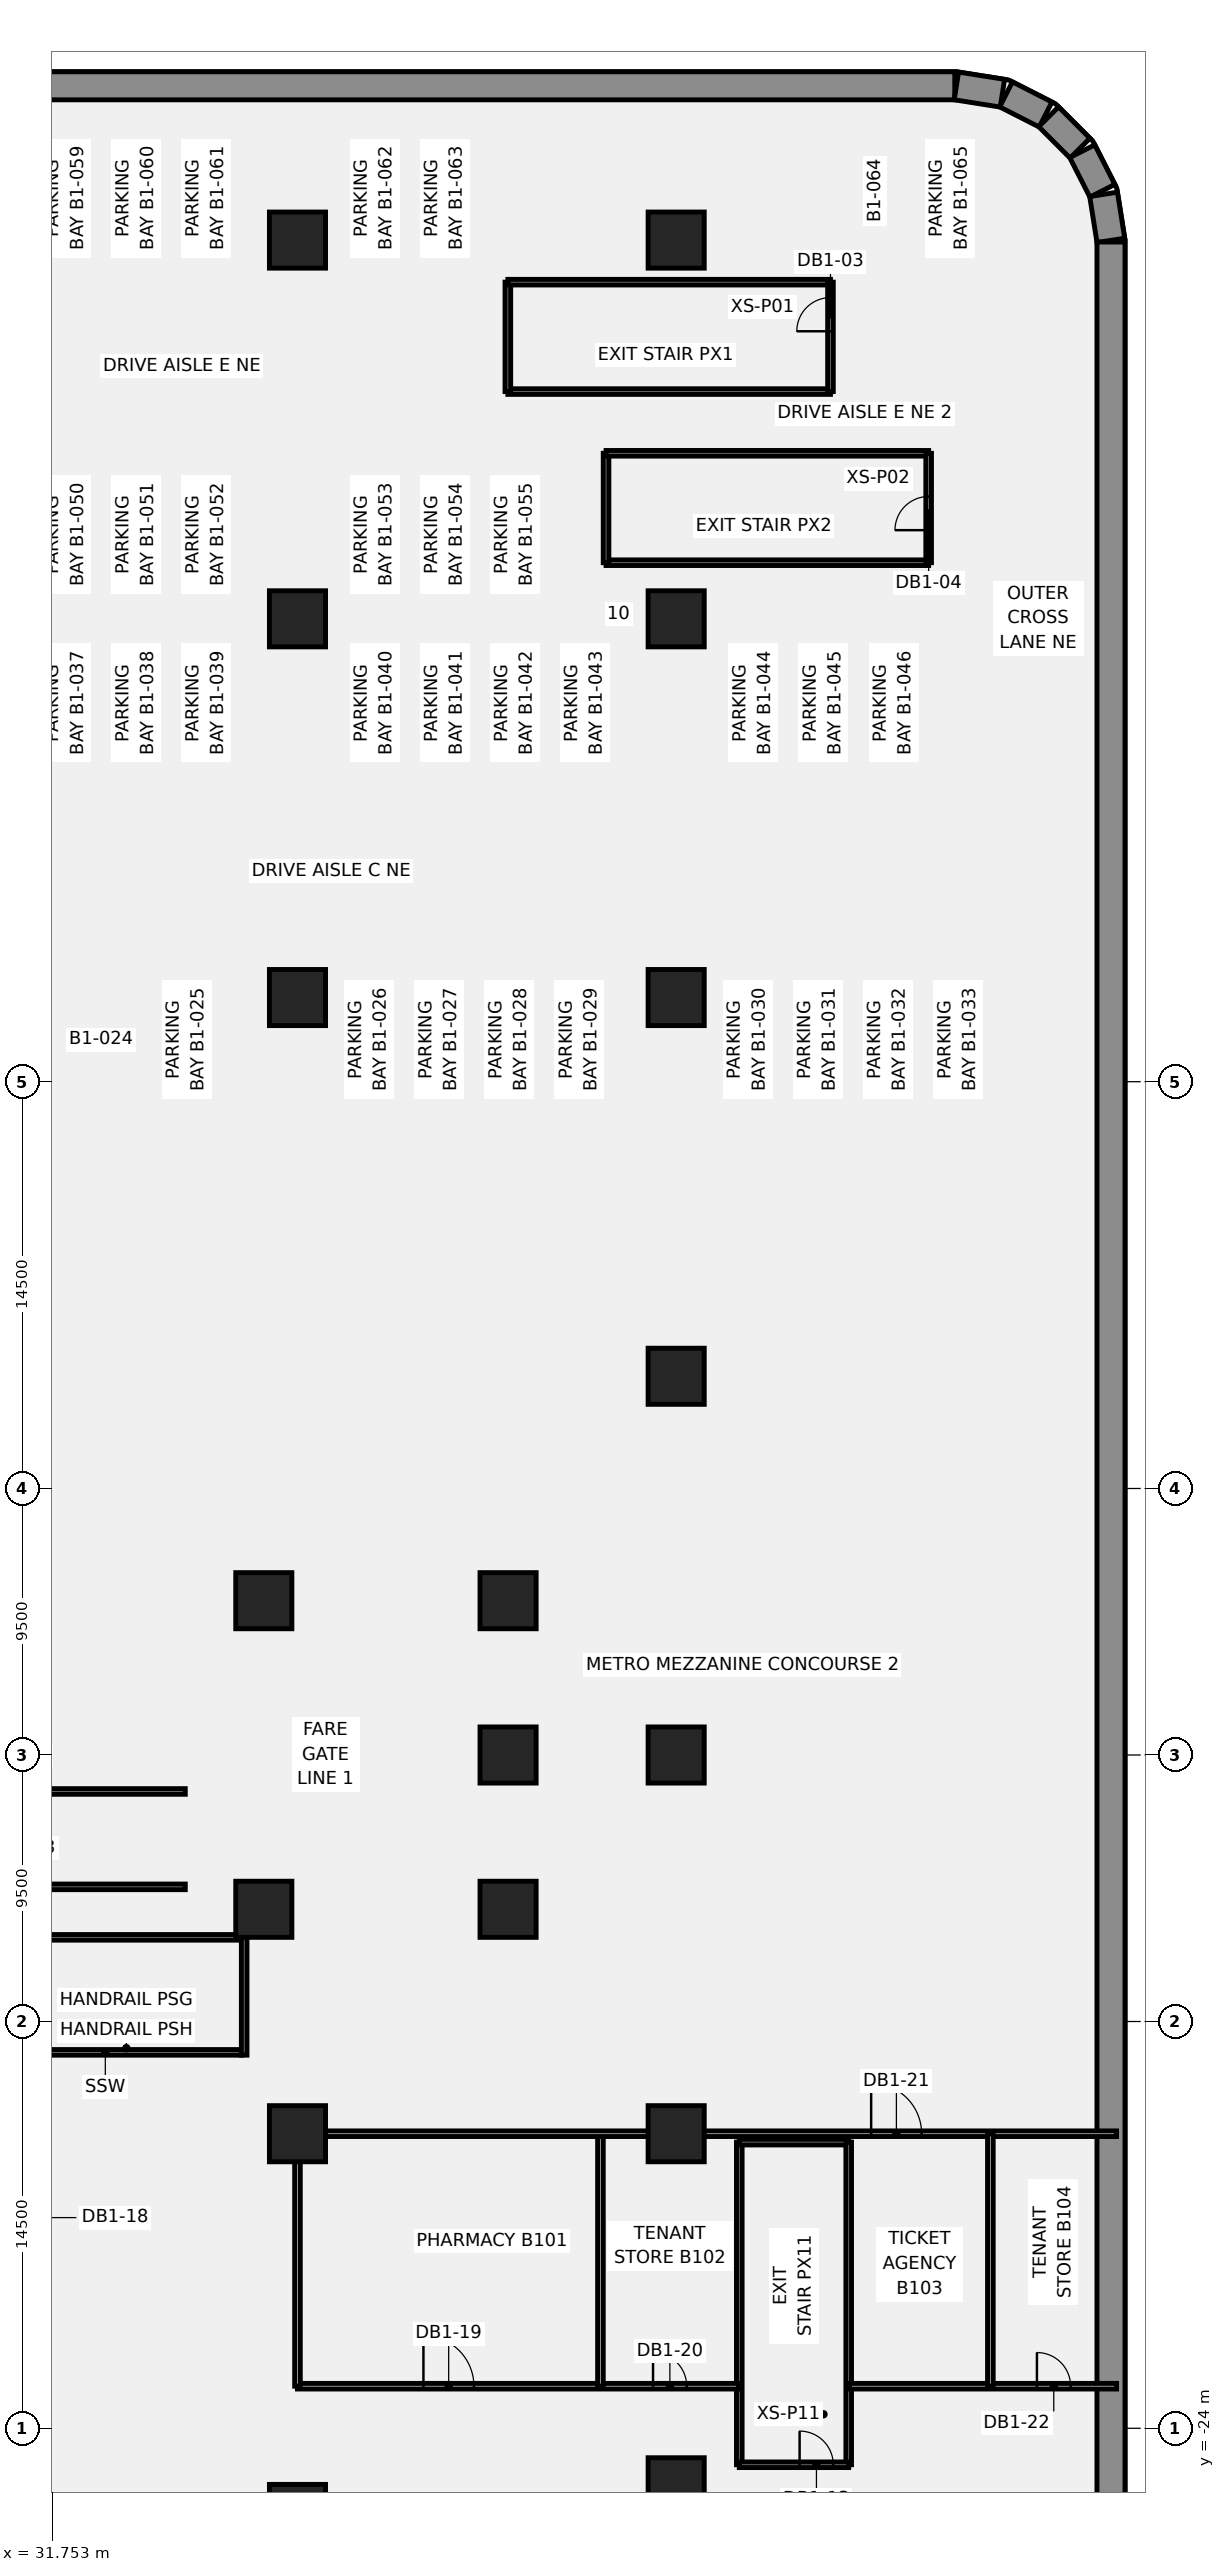
"""IFC4 building model, lengths in metres.
Left out: names, types, materials, properties, quantities, classifications, styles, units other than length and angle.
Written with IfcOpenShell. Run it as: python <this file> out.ifc"""

import sys

from ifc_helpers import new_model, si_unit, direction, frame, frame_2d, origin, origin_2d, place, context, subcontext, project, spatial, polyline, rectangle, outline, extrude, element, fill, save


model = new_model("IFC4")
c1 = context("Model", 3, precision=1e-05, world=origin(), true_north=direction((0.0, 1.0)))
c2 = subcontext(c1, "Body", "Model", "MODEL_VIEW")
j1 = project(units=[si_unit("LENGTHUNIT", "METRE"), si_unit("PLANEANGLEUNIT", "RADIAN")], contexts=[c1])
p1 = place(None, origin())
s1 = spatial("IfcSite", under=j1, at=p1, CompositionType="ELEMENT")
p2 = place(p1, origin())
s2 = spatial("IfcBuilding", under=s1, at=p2, CompositionType="ELEMENT")
p3 = place(p2, frame((0.0, 0.0, -7.0)))
s3 = spatial("IfcBuildingStorey", under=s2, at=p3, CompositionType="ELEMENT", Elevation=-7.0)
p4 = place(p3, frame((-63.931, 59.5, -0.45), z_axis=(0.0, 0.0, 1.0), x_axis=(1.0, 0.0, 0.0)))
e1 = element("IfcWall", 1, at=p4, inside=s3, PredefinedType="SOLIDWALL", context=c2, shape_type="SweptSolid", body=[
    extrude(rectangle(XDim=127.863, YDim=1.0, at=frame_2d((63.931, 0.0))), origin(), (0.0, 0.0, 1.0), 6.9),
])
p5 = place(p3, frame((63.99, 59.495, -0.45), z_axis=(0.0, 0.0, 1.0), x_axis=(0.987688946427, -0.156430639922, 0.0)))
e2 = element("IfcWall", 2, at=p5, inside=s3, PredefinedType="SOLIDWALL", context=c2, shape_type="SweptSolid", body=[
    extrude(rectangle(XDim=1.661, YDim=1.0, at=frame_2d((0.83, 0.0))), origin(), (0.0, 0.0, 1.0), 6.9),
])
for number, where, z_axis, x_axis in (
    (3, (65.759, 59.194, -0.45), (0.0, 0.0, 1.0), (0.891, -0.454, 0.0)),
    (4, (67.278, 58.396, -0.45), (0.0, 0.0, 1.0), (0.707, -0.707, 0.0)),
    (5, (68.476, 57.168, -0.45), (0.0, 0.0, 1.0), (0.454, -0.891, 0.0)),
):
    element("IfcWall", number, at=place(p3, frame(where, z_axis=z_axis, x_axis=x_axis)), inside=s3, PredefinedType="SOLIDWALL", context=c2, shape_type="SweptSolid", body=[
        extrude(rectangle(XDim=1.581, YDim=1.0, at=frame_2d((0.791, 0.0))), origin(), (0.0, 0.0, 1.0), 6.9),
    ])
p6 = place(p3, frame((69.236, 55.63, -0.45), z_axis=(0.0, 0.0, 1.0), x_axis=(0.156430639922, -0.987688946427, 0.0)))
e6 = element("IfcWall", 6, at=p6, inside=s3, PredefinedType="SOLIDWALL", context=c2, shape_type="SweptSolid", body=[
    extrude(rectangle(XDim=1.661, YDim=1.0, at=frame_2d((0.83, 0.0))), origin(), (0.0, 0.0, 1.0), 6.9),
])
p7 = place(p3, frame((69.5, 53.931, -0.45), z_axis=(0.0, 0.0, 1.0), x_axis=(0.0, -1.0, 0.0)))
e7 = element("IfcWall", 7, at=p7, inside=s3, PredefinedType="SOLIDWALL", context=c2, shape_type="SweptSolid", body=[
    extrude(rectangle(XDim=107.863, YDim=1.0, at=frame_2d((53.931, 0.0))), origin(), (0.0, 0.0, 1.0), 6.9),
])
for number, where, z_axis, x_axis in (
    (8, (39.3, 5.5, -0.45), (0.0, 0.0, 1.0), (1.0, 0.0, 0.0)),
    (9, (39.3, -5.5, -0.45), (0.0, 0.0, 1.0), (1.0, 0.0, 0.0)),
    (10, (48.008, -5.5, -0.45), (0.0, 0.0, 1.0), (1.0, 0.0, 0.0)),
    (11, (48.008, 0.0, -0.45), (0.0, 0.0, 1.0), (1.0, 0.0, 0.0)),
    (12, (48.008, 5.5, -0.45), (0.0, 0.0, 1.0), (1.0, 0.0, 0.0)),
    (13, (40.5, -27.0, -0.45), (0.0, 0.0, 1.0), (1.0, 0.0, 0.0)),
    (14, (40.5, -13.5, -0.45), (0.0, 0.0, 1.0), (1.0, 0.0, 0.0)),
    (15, (40.5, 27.0, -0.45), (0.0, 0.0, 1.0), (1.0, 0.0, 0.0)),
    (16, (40.5, 40.5, -0.45), (0.0, 0.0, 1.0), (1.0, 0.0, 0.0)),
    (17, (40.5, 54.0, -0.45), (0.0, 0.0, 1.0), (1.0, 0.0, 0.0)),
    (18, (54.0, -26.05, -0.45), (0.0, 0.0, 1.0), (1.0, 0.0, 0.0)),
    (19, (54.0, -13.5, -0.45), (0.0, 0.0, 1.0), (1.0, 0.0, 0.0)),
    (20, (54.0, 0.0, -0.45), (0.0, 0.0, 1.0), (1.0, 0.0, 0.0)),
    (21, (54.0, 13.5, -0.45), (0.0, 0.0, 1.0), (1.0, 0.0, 0.0)),
    (22, (54.0, 27.0, -0.45), (0.0, 0.0, 1.0), (1.0, 0.0, 0.0)),
    (23, (54.0, 40.5, -0.45), (0.0, 0.0, 1.0), (1.0, 0.0, 0.0)),
    (24, (54.0, 54.0, -0.45), (0.0, 0.0, 1.0), (1.0, 0.0, 0.0)),
):
    element("IfcColumn", number, at=place(p3, frame(where, z_axis=z_axis, x_axis=x_axis)), inside=s3, PredefinedType="COLUMN", context=c2, shape_type="SweptSolid", body=[
        extrude(rectangle(XDim=2.0, YDim=2.0, at=origin_2d()), origin(), (0.0, 0.0, 1.0), 6.9),
    ])
p8 = place(p3, frame((56.25, -25.3, 0.0), z_axis=(0.0, 0.0, 1.0), x_axis=(0.0, 1.0, 0.0)))
e25 = element("IfcWall", 25, at=p8, inside=s3, PredefinedType="PARTITIONING", context=c2, shape_type="SweptSolid", body=[
    extrude(rectangle(XDim=11.5, YDim=0.2, at=frame_2d((5.75, 0.0))), origin(), (0.0, 0.0, 1.0), 6.45),
])
p9 = place(p3, frame((56.25, -13.8, 0.0), z_axis=(0.0, 0.0, 1.0), x_axis=(1.0, 0.0, 0.0)))
e26 = element("IfcWall", 26, at=p9, inside=s3, PredefinedType="PARTITIONING", context=c2, shape_type="SweptSolid", body=[
    extrude(rectangle(XDim=3.9, YDim=0.2, at=frame_2d((1.95, 0.0))), origin(), (0.0, 0.0, 1.0), 6.45),
])
p10 = place(p3, frame((60.15, -25.3, 0.0), z_axis=(0.0, 0.0, 1.0), x_axis=(0.0, 1.0, 0.0)))
e27 = element("IfcWall", 27, at=p10, inside=s3, PredefinedType="PARTITIONING", context=c2, shape_type="SweptSolid", body=[
    extrude(rectangle(XDim=11.5, YDim=0.2, at=frame_2d((5.75, 0.0))), origin(), (0.0, 0.0, 1.0), 6.45),
])
p11 = place(p3, frame((56.25, -25.3, 0.0), z_axis=(0.0, 0.0, 1.0), x_axis=(1.0, 0.0, 0.0)))
e28 = element("IfcWall", 28, at=p11, inside=s3, PredefinedType="PARTITIONING", context=c2, shape_type="SweptSolid", body=[
    extrude(rectangle(XDim=3.9, YDim=0.2, at=frame_2d((1.95, 0.0))), origin(), (0.0, 0.0, 1.0), 6.45),
])
p12 = place(p11, frame((2.15, 0.0, 0.0)))
e29 = element("IfcOpeningElement", 29, at=p12, cuts=e28, PredefinedType="OPENING", context=c2, shape_type="SweptSolid", body=[
    extrude(rectangle(XDim=1.2, YDim=2.1, at=frame_2d((0.6, 1.05))), frame((0.0, 0.11, 0.0), z_axis=(0.0, -1.0, 0.0), x_axis=(1.0, 0.0, 0.0)), (0.0, 0.0, 1.0), 0.22),
])
p13 = place(p3, frame((48.0, 48.6, 0.0), z_axis=(0.0, 0.0, 1.0), x_axis=(1.0, 0.0, 0.0)))
e30 = element("IfcWall", 30, at=p13, inside=s3, PredefinedType="PARTITIONING", context=c2, shape_type="SweptSolid", body=[
    extrude(rectangle(XDim=11.5, YDim=0.2, at=frame_2d((5.75, 0.0))), origin(), (0.0, 0.0, 1.0), 6.45),
])
p14 = place(p3, frame((48.0, 48.6, 0.0), z_axis=(0.0, 0.0, 1.0), x_axis=(0.0, 1.0, 0.0)))
e31 = element("IfcWall", 31, at=p14, inside=s3, PredefinedType="PARTITIONING", context=c2, shape_type="SweptSolid", body=[
    extrude(rectangle(XDim=3.9, YDim=0.2, at=frame_2d((1.95, 0.0))), origin(), (0.0, 0.0, 1.0), 6.45),
])
p15 = place(p3, frame((48.0, 52.5, 0.0), z_axis=(0.0, 0.0, 1.0), x_axis=(1.0, 0.0, 0.0)))
e32 = element("IfcWall", 32, at=p15, inside=s3, PredefinedType="PARTITIONING", context=c2, shape_type="SweptSolid", body=[
    extrude(rectangle(XDim=11.5, YDim=0.2, at=frame_2d((5.75, 0.0))), origin(), (0.0, 0.0, 1.0), 6.45),
])
p16 = place(p3, frame((59.5, 48.6, 0.0), z_axis=(0.0, 0.0, 1.0), x_axis=(0.0, 1.0, 0.0)))
e33 = element("IfcWall", 33, at=p16, inside=s3, PredefinedType="PARTITIONING", context=c2, shape_type="SweptSolid", body=[
    extrude(rectangle(XDim=3.9, YDim=0.2, at=frame_2d((1.95, 0.0))), origin(), (0.0, 0.0, 1.0), 6.45),
])
p17 = place(p16, frame((2.15, 0.0, 0.0)))
e34 = element("IfcOpeningElement", 34, at=p17, cuts=e33, PredefinedType="OPENING", context=c2, shape_type="SweptSolid", body=[
    extrude(rectangle(XDim=1.2, YDim=2.1, at=frame_2d((0.6, 1.05))), frame((0.0, 0.11, 0.0), z_axis=(0.0, -1.0, 0.0), x_axis=(1.0, 0.0, 0.0)), (0.0, 0.0, 1.0), 0.22),
])
p18 = place(p3, frame((51.5, 42.5, 0.0), z_axis=(0.0, 0.0, 1.0), x_axis=(1.0, 0.0, 0.0)))
e35 = element("IfcWall", 35, at=p18, inside=s3, PredefinedType="PARTITIONING", context=c2, shape_type="SweptSolid", body=[
    extrude(rectangle(XDim=11.5, YDim=0.2, at=frame_2d((5.75, 0.0))), origin(), (0.0, 0.0, 1.0), 6.45),
])
p19 = place(p3, frame((51.5, 42.5, 0.0), z_axis=(0.0, 0.0, 1.0), x_axis=(0.0, 1.0, 0.0)))
e36 = element("IfcWall", 36, at=p19, inside=s3, PredefinedType="PARTITIONING", context=c2, shape_type="SweptSolid", body=[
    extrude(rectangle(XDim=3.9, YDim=0.2, at=frame_2d((1.95, 0.0))), origin(), (0.0, 0.0, 1.0), 6.45),
])
p20 = place(p3, frame((51.5, 46.4, 0.0), z_axis=(0.0, 0.0, 1.0), x_axis=(1.0, 0.0, 0.0)))
e37 = element("IfcWall", 37, at=p20, inside=s3, PredefinedType="PARTITIONING", context=c2, shape_type="SweptSolid", body=[
    extrude(rectangle(XDim=11.5, YDim=0.2, at=frame_2d((5.75, 0.0))), origin(), (0.0, 0.0, 1.0), 6.45),
])
p21 = place(p3, frame((63.0, 42.5, 0.0), z_axis=(0.0, 0.0, 1.0), x_axis=(0.0, 1.0, 0.0)))
e38 = element("IfcWall", 38, at=p21, inside=s3, PredefinedType="PARTITIONING", context=c2, shape_type="SweptSolid", body=[
    extrude(rectangle(XDim=3.9, YDim=0.2, at=frame_2d((1.95, 0.0))), origin(), (0.0, 0.0, 1.0), 6.45),
])
p22 = place(p21, frame((1.16, 0.0, 0.0)))
e39 = element("IfcOpeningElement", 39, at=p22, cuts=e38, PredefinedType="OPENING", context=c2, shape_type="SweptSolid", body=[
    extrude(rectangle(XDim=1.2, YDim=2.1, at=frame_2d((0.6, 1.05))), frame((0.0, 0.11, 0.0), z_axis=(0.0, -1.0, 0.0), x_axis=(1.0, 0.0, 0.0)), (0.0, 0.0, 1.0), 0.22),
])
p23 = place(p3, frame((40.5, -22.5, 0.0), z_axis=(0.0, 0.0, 1.0), x_axis=(1.0, 0.0, 0.0)))
e40 = element("IfcWall", 40, at=p23, inside=s3, PredefinedType="PARTITIONING", context=c2, shape_type="SweptSolid", body=[
    extrude(rectangle(XDim=15.72, YDim=0.2, at=frame_2d((7.86, 0.0))), origin(), (0.0, 0.0, 1.0), 6.45),
])
p24 = place(p23, frame((4.49, 0.0, 0.0)))
e41 = element("IfcOpeningElement", 41, at=p24, cuts=e40, PredefinedType="OPENING", context=c2, shape_type="SweptSolid", body=[
    extrude(rectangle(XDim=1.8, YDim=2.1, at=frame_2d((0.9, 1.05))), frame((0.0, 0.11, 0.0), z_axis=(0.0, -1.0, 0.0), x_axis=(1.0, 0.0, 0.0)), (0.0, 0.0, 1.0), 0.22),
])
p25 = place(p23, frame((12.675, 0.0, 0.0)))
e42 = element("IfcOpeningElement", 42, at=p25, cuts=e40, PredefinedType="OPENING", context=c2, shape_type="SweptSolid", body=[
    extrude(rectangle(XDim=1.2, YDim=2.1, at=frame_2d((0.6, 1.05))), frame((0.0, 0.11, 0.0), z_axis=(0.0, -1.0, 0.0), x_axis=(1.0, 0.0, 0.0)), (0.0, 0.0, 1.0), 0.22),
])
for number, where, z_axis, x_axis in (
    (43, (51.3, -22.5, 0.0), (0.0, 0.0, 1.0), (0.0, 1.0, 0.0)),
    (44, (40.5, -22.5, 0.0), (0.0, 0.0, 1.0), (0.0, 1.0, 0.0)),
):
    element("IfcWall", number, at=place(p3, frame(where, z_axis=z_axis, x_axis=x_axis)), inside=s3, PredefinedType="PARTITIONING", context=c2, shape_type="SweptSolid", body=[
        extrude(rectangle(XDim=9.0, YDim=0.2, at=frame_2d((4.5, 0.0))), origin(), (0.0, 0.0, 1.0), 6.45),
    ])
p26 = place(p3, frame((40.5, -13.5, 0.0), z_axis=(0.0, 0.0, 1.0), x_axis=(1.0, 0.0, 0.0)))
e45 = element("IfcWall", 45, at=p26, inside=s3, PredefinedType="PARTITIONING", context=c2, shape_type="SweptSolid", body=[
    extrude(rectangle(XDim=29.199, YDim=0.2, at=frame_2d((14.6, 0.0))), origin(), (0.0, 0.0, 1.0), 6.45),
])
p27 = place(p26, frame((20.45, 0.0, 0.0)))
e46 = element("IfcOpeningElement", 46, at=p27, cuts=e45, PredefinedType="OPENING", context=c2, shape_type="SweptSolid", body=[
    extrude(rectangle(XDim=1.8, YDim=2.1, at=frame_2d((0.9, 1.05))), frame((0.0, 0.11, 0.0), z_axis=(0.0, -1.0, 0.0), x_axis=(1.0, 0.0, 0.0)), (0.0, 0.0, 1.0), 0.22),
])
p28 = place(p3, frame((60.18, -22.5, 0.0), z_axis=(0.0, 0.0, 1.0), x_axis=(1.0, 0.0, 0.0)))
e47 = element("IfcWall", 47, at=p28, inside=s3, PredefinedType="PARTITIONING", context=c2, shape_type="SweptSolid", body=[
    extrude(rectangle(XDim=9.519, YDim=0.2, at=frame_2d((4.76, 0.0))), origin(), (0.0, 0.0, 1.0), 6.45),
])
p29 = place(p28, frame((6.68, 0.0, 0.0)))
e48 = element("IfcOpeningElement", 48, at=p29, cuts=e47, PredefinedType="OPENING", context=c2, shape_type="SweptSolid", body=[
    extrude(rectangle(XDim=1.2, YDim=2.1, at=frame_2d((0.6, 1.05))), frame((0.0, 0.11, 0.0), z_axis=(0.0, -1.0, 0.0), x_axis=(1.0, 0.0, 0.0)), (0.0, 0.0, 1.0), 0.22),
])
p30 = place(p3, frame((65.2, -22.5, 0.0), z_axis=(0.0, 0.0, 1.0), x_axis=(0.0, 1.0, 0.0)))
e49 = element("IfcWall", 49, at=p30, inside=s3, PredefinedType="PARTITIONING", context=c2, shape_type="SweptSolid", body=[
    extrude(rectangle(XDim=9.0, YDim=0.2, at=frame_2d((4.5, 0.0))), origin(), (0.0, 0.0, 1.0), 6.45),
])
for number, where, z_axis, x_axis in (
    (50, (28.8, -10.6, 0.0), (0.0, 0.0, 1.0), (1.0, 0.0, 0.0)),
    (51, (28.8, -6.5, 0.0), (0.0, 0.0, 1.0), (1.0, 0.0, 0.0)),
):
    element("IfcWall", number, at=place(p3, frame(where, z_axis=z_axis, x_axis=x_axis)), inside=s3, PredefinedType="SOLIDWALL", context=c2, shape_type="SweptSolid", body=[
        extrude(rectangle(XDim=9.7, YDim=0.2, at=frame_2d((4.85, 0.0))), origin(), (0.0, 0.0, 1.0), 6.45),
    ])
p31 = place(p3, frame((38.6, -10.7, 0.0), z_axis=(0.0, 0.0, 1.0), x_axis=(0.0, 1.0, 0.0)))
e52 = element("IfcWall", 52, at=p31, inside=s3, PredefinedType="SOLIDWALL", context=c2, shape_type="SweptSolid", body=[
    extrude(rectangle(XDim=4.3, YDim=0.2, at=frame_2d((2.15, 0.0))), origin(), (0.0, 0.0, 1.0), 6.45),
])
p32 = place(p3, frame((29.8, -1.3, 0.0), z_axis=(0.0, 0.0, 1.0), x_axis=(1.0, 0.0, 0.0)))
e53 = element("IfcWall", 53, at=p32, inside=s3, PredefinedType="SHEAR", context=c2, shape_type="SweptSolid", body=[
    extrude(rectangle(XDim=6.7, YDim=0.2, at=frame_2d((3.35, 0.0))), origin(), (0.0, 0.0, 1.0), 6.45),
])
p33 = place(p32, frame((0.35, 0.0, 0.0)))
e54 = element("IfcOpeningElement", 54, at=p33, cuts=e53, PredefinedType="OPENING", context=c2, shape_type="SweptSolid", body=[
    extrude(rectangle(XDim=1.0, YDim=2.1, at=frame_2d((0.5, 1.05))), frame((0.0, 0.11, 0.0), z_axis=(0.0, -1.0, 0.0), x_axis=(1.0, 0.0, 0.0)), (0.0, 0.0, 1.0), 0.22),
])
p34 = place(p3, frame((29.8, -4.7, 0.0), z_axis=(0.0, 0.0, 1.0), x_axis=(1.0, 0.0, 0.0)))
e55 = element("IfcWall", 55, at=p34, inside=s3, PredefinedType="SHEAR", context=c2, shape_type="SweptSolid", body=[
    extrude(rectangle(XDim=6.7, YDim=0.2, at=frame_2d((3.35, 0.0))), origin(), (0.0, 0.0, 1.0), 6.45),
])
p35 = place(p3, origin())
e56 = element("IfcWall", 56, at=p35, inside=s3, PredefinedType="SHEAR", context=c2, shape_type="SweptSolid", body=[
    extrude(outline(polyline([(36.3, -4.6), (36.5, -4.6), (36.5, -1.4), (36.3, -1.4), (36.3, -4.6)])), origin(), (0.0, 0.0, 1.0), 6.45),
])
p36 = place(p17, origin())
e57 = element("IfcDoor", 57, at=p36, inside=s3, OperationType="SINGLE_SWING_LEFT", PredefinedType="DOOR", context=c2, shape_type="SweptSolid", body=[
    extrude(rectangle(XDim=1.2, YDim=2.1, at=frame_2d((0.6, 1.05))), frame((0.0, 0.025, 0.0), z_axis=(0.0, -1.0, 0.0), x_axis=(1.0, 0.0, 0.0)), (0.0, 0.0, 1.0), 0.05),
])
fill(e34, e57)
p37 = place(p22, origin())
e58 = element("IfcDoor", 58, at=p37, inside=s3, OperationType="SINGLE_SWING_RIGHT", PredefinedType="DOOR", context=c2, shape_type="SweptSolid", body=[
    extrude(rectangle(XDim=1.2, YDim=2.1, at=frame_2d((0.6, 1.05))), frame((0.0, 0.025, 0.0), z_axis=(0.0, -1.0, 0.0), x_axis=(1.0, 0.0, 0.0)), (0.0, 0.0, 1.0), 0.05),
])
fill(e39, e58)
p38 = place(p12, origin())
e59 = element("IfcDoor", 59, at=p38, inside=s3, OperationType="SINGLE_SWING_LEFT", PredefinedType="DOOR", context=c2, shape_type="SweptSolid", body=[
    extrude(rectangle(XDim=1.2, YDim=2.1, at=frame_2d((0.6, 1.05))), frame((0.0, 0.025, 0.0), z_axis=(0.0, -1.0, 0.0), x_axis=(1.0, 0.0, 0.0)), (0.0, 0.0, 1.0), 0.05),
])
fill(e29, e59)
p39 = place(p24, origin())
e60 = element("IfcDoor", 60, at=p39, inside=s3, OperationType="SINGLE_SWING_LEFT", PredefinedType="DOOR", context=c2, shape_type="SweptSolid", body=[
    extrude(rectangle(XDim=1.8, YDim=2.1, at=frame_2d((0.9, 1.05))), frame((0.0, 0.025, 0.0), z_axis=(0.0, -1.0, 0.0), x_axis=(1.0, 0.0, 0.0)), (0.0, 0.0, 1.0), 0.05),
])
fill(e41, e60)
p40 = place(p25, origin())
e61 = element("IfcDoor", 61, at=p40, inside=s3, OperationType="SINGLE_SWING_RIGHT", PredefinedType="DOOR", context=c2, shape_type="SweptSolid", body=[
    extrude(rectangle(XDim=1.2, YDim=2.1, at=frame_2d((0.6, 1.05))), frame((0.0, 0.025, 0.0), z_axis=(0.0, -1.0, 0.0), x_axis=(1.0, 0.0, 0.0)), (0.0, 0.0, 1.0), 0.05),
])
fill(e42, e61)
p41 = place(p27, origin())
e62 = element("IfcDoor", 62, at=p41, inside=s3, OperationType="SINGLE_SWING_LEFT", PredefinedType="DOOR", context=c2, shape_type="SweptSolid", body=[
    extrude(rectangle(XDim=1.8, YDim=2.1, at=frame_2d((0.9, 1.05))), frame((0.0, 0.025, 0.0), z_axis=(0.0, -1.0, 0.0), x_axis=(1.0, 0.0, 0.0)), (0.0, 0.0, 1.0), 0.05),
])
fill(e46, e62)
p42 = place(p29, origin())
e63 = element("IfcDoor", 63, at=p42, inside=s3, OperationType="SINGLE_SWING_RIGHT", PredefinedType="DOOR", context=c2, shape_type="SweptSolid", body=[
    extrude(rectangle(XDim=1.2, YDim=2.1, at=frame_2d((0.6, 1.05))), frame((0.0, 0.025, 0.0), z_axis=(0.0, -1.0, 0.0), x_axis=(1.0, 0.0, 0.0)), (0.0, 0.0, 1.0), 0.05),
])
fill(e48, e63)
save(model, sys.argv[1])
